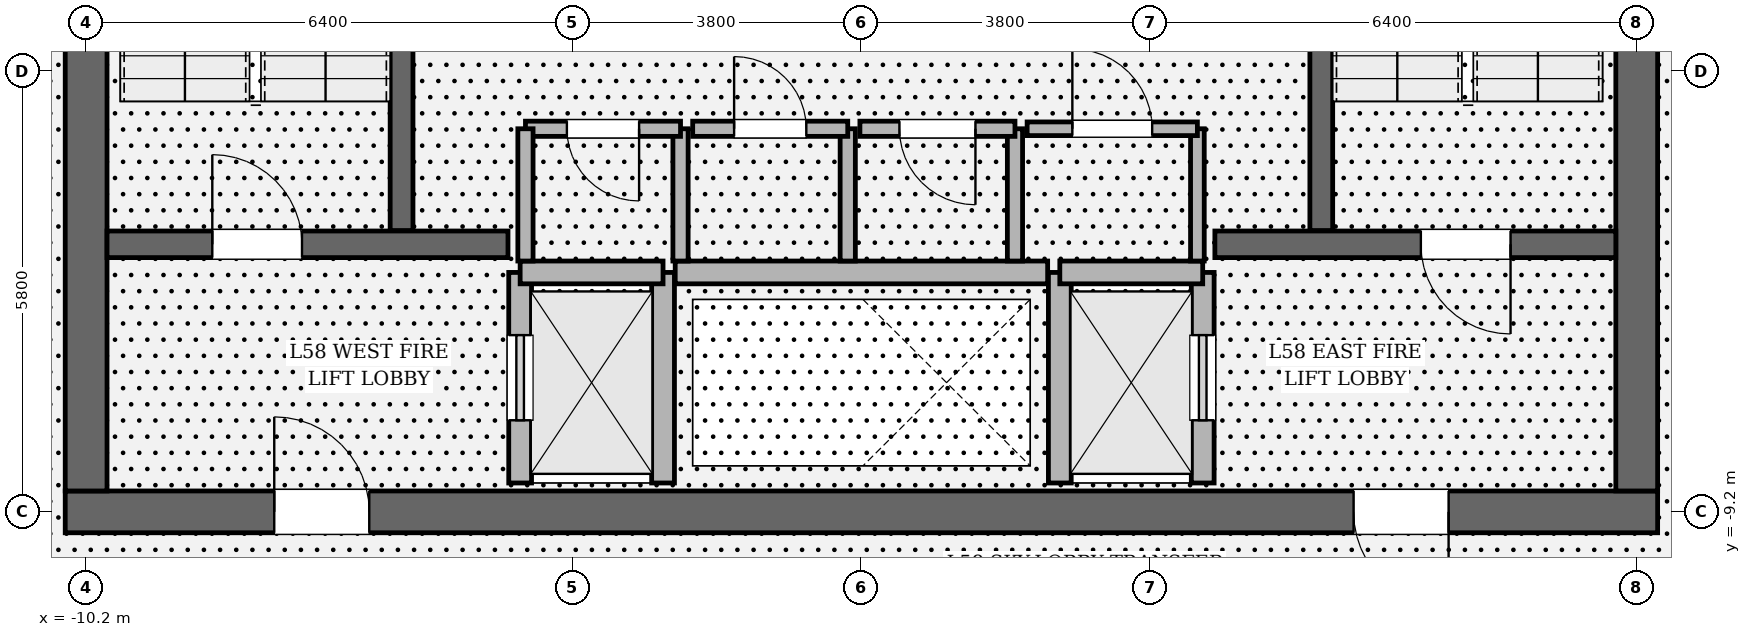
"""IFC4 building model, lengths in metres.
Left out: names, types, materials, properties, quantities, classifications, styles, units other than length and angle.
Written with IfcOpenShell. Run it as: python <this file> out.ifc"""

import sys

from ifc_helpers import new_model, si_unit, direction, frame, frame_2d, origin, place, context, subcontext, project, spatial, rectangle, extrude, element, fill, save


model = new_model("IFC4")
c1 = context("Model", 3, precision=1e-05, world=origin(), true_north=direction((0.0, 1.0)))
c2 = subcontext(c1, "Body", "Model", "MODEL_VIEW")
j1 = project(units=[si_unit("LENGTHUNIT", "METRE"), si_unit("PLANEANGLEUNIT", "RADIAN")], contexts=[c1])
p1 = place(None, origin())
s1 = spatial("IfcSite", under=j1, at=p1, CompositionType="ELEMENT")
p2 = place(p1, origin())
s2 = spatial("IfcBuilding", under=s1, at=p2, CompositionType="ELEMENT")
p3 = place(p2, frame((0.0, 0.0, 246.6)))
s3 = spatial("IfcBuildingStorey", under=s2, at=p3, CompositionType="ELEMENT", Elevation=246.6)
p4 = place(p3, frame((10.475, -9.2, 0.0), z_axis=(0.0, 0.0, 1.0), x_axis=(-1.0, 0.0, 0.0)))
e1 = element("IfcWall", 1, at=p4, inside=s3, PredefinedType="SHEAR", context=c2, shape_type="SweptSolid", body=[
    extrude(rectangle(XDim=20.95, YDim=0.55, at=frame_2d((10.475, 0.0))), origin(), (0.0, 0.0, 1.0), 4.8),
])
p5 = place(p4, frame((2.75, 0.0, 0.0)))
e2 = element("IfcOpeningElement", 2, at=p5, cuts=e1, PredefinedType="OPENING", context=c2, shape_type="SweptSolid", body=[
    extrude(rectangle(XDim=1.25, YDim=2.25, at=frame_2d((0.625, 1.125))), frame((0.0, 0.285, 0.0), z_axis=(0.0, -1.0, 0.0), x_axis=(1.0, 0.0, 0.0)), (0.0, 0.0, 1.0), 0.57),
])
p6 = place(p4, frame((16.95, 0.0, 0.0)))
e3 = element("IfcOpeningElement", 3, at=p6, cuts=e1, PredefinedType="OPENING", context=c2, shape_type="SweptSolid", body=[
    extrude(rectangle(XDim=1.25, YDim=2.25, at=frame_2d((0.625, 1.125))), frame((0.0, 0.285, 0.0), z_axis=(0.0, -1.0, 0.0), x_axis=(1.0, 0.0, 0.0)), (0.0, 0.0, 1.0), 0.57),
])
p7 = place(p3, frame((-10.2, -8.925, 0.0), z_axis=(0.0, 0.0, 1.0), x_axis=(0.0, 1.0, 0.0)))
e4 = element("IfcWall", 4, at=p7, inside=s3, PredefinedType="SHEAR", context=c2, shape_type="SweptSolid", body=[
    extrude(rectangle(XDim=17.85, YDim=0.55, at=frame_2d((8.925, 0.0))), origin(), (0.0, 0.0, 1.0), 4.8),
])
p8 = place(p7, frame((12.715, 0.0, 0.0)))
e5 = element("IfcOpeningElement", 5, at=p8, cuts=e4, PredefinedType="OPENING", context=c2, shape_type="SweptSolid", body=[
    extrude(rectangle(XDim=1.18, YDim=2.2, at=frame_2d((0.59, 1.1))), frame((0.0, 0.285, 0.0), z_axis=(0.0, -1.0, 0.0), x_axis=(1.0, 0.0, 0.0)), (0.0, 0.0, 1.0), 0.57),
])
p9 = place(p3, frame((10.2, 8.925, 0.0), z_axis=(0.0, 0.0, 1.0), x_axis=(0.0, -1.0, 0.0)))
e6 = element("IfcWall", 6, at=p9, inside=s3, PredefinedType="SHEAR", context=c2, shape_type="SweptSolid", body=[
    extrude(rectangle(XDim=17.85, YDim=0.55, at=frame_2d((8.925, 0.0))), origin(), (0.0, 0.0, 1.0), 4.8),
])
p10 = place(p9, frame((3.955, 0.0, 0.0)))
e7 = element("IfcOpeningElement", 7, at=p10, cuts=e6, PredefinedType="OPENING", context=c2, shape_type="SweptSolid", body=[
    extrude(rectangle(XDim=1.18, YDim=2.2, at=frame_2d((0.59, 1.1))), frame((0.0, 0.285, 0.0), z_axis=(0.0, -1.0, 0.0), x_axis=(1.0, 0.0, 0.0)), (0.0, 0.0, 1.0), 0.57),
])
p11 = place(p9, frame((1.765, 0.0, 0.0)))
e8 = element("IfcOpeningElement", 8, at=p11, cuts=e6, PredefinedType="OPENING", context=c2, shape_type="SweptSolid", body=[
    extrude(rectangle(XDim=1.12, YDim=2.25, at=frame_2d((0.56, 1.125))), frame((0.0, 0.285, 0.0), z_axis=(0.0, -1.0, 0.0), x_axis=(1.0, 0.0, 0.0)), (0.0, 0.0, 1.0), 0.57),
])
p12 = place(p9, frame((0.385, 0.0, 0.0)))
e9 = element("IfcOpeningElement", 9, at=p12, cuts=e6, PredefinedType="OPENING", context=c2, shape_type="SweptSolid", body=[
    extrude(rectangle(XDim=1.12, YDim=2.25, at=frame_2d((0.56, 1.125))), frame((0.0, 0.285, 0.0), z_axis=(0.0, -1.0, 0.0), x_axis=(1.0, 0.0, 0.0)), (0.0, 0.0, 1.0), 0.57),
])
for number, where, z_axis, x_axis in (
    (10, (-6.05, -5.5, 0.0), (0.0, 0.0, 1.0), (0.0, 1.0, 0.0)),
    (11, (6.05, 3.45, 0.0), (0.0, 0.0, 1.0), (0.0, -1.0, 0.0)),
):
    element("IfcWall", number, at=place(p3, frame(where, z_axis=z_axis, x_axis=x_axis)), inside=s3, PredefinedType="SOLIDWALL", context=c2, shape_type="SweptSolid", body=[
        extrude(rectangle(XDim=8.95, YDim=0.3, at=frame_2d((4.475, 0.0))), origin(), (0.0, 0.0, 1.0), 4.8),
    ])
p13 = place(p3, frame((-9.925, -5.68, 0.0), z_axis=(0.0, 0.0, 1.0), x_axis=(1.0, 0.0, 0.0)))
e12 = element("IfcWall", 12, at=p13, inside=s3, PredefinedType="SOLIDWALL", context=c2, shape_type="SweptSolid", body=[
    extrude(rectangle(XDim=5.275, YDim=0.35, at=frame_2d((2.638, 0.0))), origin(), (0.0, 0.0, 1.0), 4.8),
])
p14 = place(p13, frame((1.385, 0.0, 0.0)))
e13 = element("IfcOpeningElement", 13, at=p14, cuts=e12, PredefinedType="OPENING", context=c2, shape_type="SweptSolid", body=[
    extrude(rectangle(XDim=1.18, YDim=2.2, at=frame_2d((0.59, 1.1))), frame((0.0, 0.185, 0.0), z_axis=(0.0, -1.0, 0.0), x_axis=(1.0, 0.0, 0.0)), (0.0, 0.0, 1.0), 0.37),
])
p15 = place(p3, frame((4.65, -5.68, 0.0), z_axis=(0.0, 0.0, 1.0), x_axis=(1.0, 0.0, 0.0)))
e14 = element("IfcWall", 14, at=p15, inside=s3, PredefinedType="SOLIDWALL", context=c2, shape_type="SweptSolid", body=[
    extrude(rectangle(XDim=5.275, YDim=0.35, at=frame_2d((2.638, 0.0))), origin(), (0.0, 0.0, 1.0), 4.8),
])
p16 = place(p15, frame((2.71, 0.0, 0.0)))
e15 = element("IfcOpeningElement", 15, at=p16, cuts=e14, PredefinedType="OPENING", context=c2, shape_type="SweptSolid", body=[
    extrude(rectangle(XDim=1.18, YDim=2.2, at=frame_2d((0.59, 1.1))), frame((0.0, 0.185, 0.0), z_axis=(0.0, -1.0, 0.0), x_axis=(1.0, 0.0, 0.0)), (0.0, 0.0, 1.0), 0.37),
])
p17 = place(p3, frame((-4.49, -8.82, 0.0), z_axis=(0.0, 0.0, 1.0), x_axis=(0.0, 1.0, 0.0)))
e16 = element("IfcWall", 16, at=p17, inside=s3, PredefinedType="SOLIDWALL", context=c2, shape_type="SweptSolid", body=[
    extrude(rectangle(XDim=2.77, YDim=0.3, at=frame_2d((1.385, 0.0))), origin(), (0.0, 0.0, 1.0), 4.52),
])
p18 = place(p17, frame((0.825, 0.0, 0.0)))
e17 = element("IfcOpeningElement", 17, at=p18, cuts=e16, PredefinedType="OPENING", context=c2, shape_type="SweptSolid", body=[
    extrude(rectangle(XDim=1.12, YDim=2.25, at=frame_2d((0.56, 1.125))), frame((0.0, 0.16, 0.0), z_axis=(0.0, -1.0, 0.0), x_axis=(1.0, 0.0, 0.0)), (0.0, 0.0, 1.0), 0.32),
])
p19 = place(p3, frame((-2.61, -8.82, 0.0), z_axis=(0.0, 0.0, 1.0), x_axis=(0.0, 1.0, 0.0)))
e18 = element("IfcWall", 18, at=p19, inside=s3, PredefinedType="SOLIDWALL", context=c2, shape_type="SweptSolid", body=[
    extrude(rectangle(XDim=2.77, YDim=0.3, at=frame_2d((1.385, 0.0))), origin(), (0.0, 0.0, 1.0), 4.52),
])
p20 = place(p3, frame((-4.49, -6.05, 0.0), z_axis=(0.0, 0.0, 1.0), x_axis=(1.0, 0.0, 0.0)))
e19 = element("IfcWall", 19, at=p20, inside=s3, PredefinedType="SOLIDWALL", context=c2, shape_type="SweptSolid", body=[
    extrude(rectangle(XDim=1.88, YDim=0.3, at=frame_2d((0.94, 0.0))), origin(), (0.0, 0.0, 1.0), 4.52),
])
p21 = place(p3, frame((4.49, -8.82, 0.0), z_axis=(0.0, 0.0, 1.0), x_axis=(0.0, 1.0, 0.0)))
e20 = element("IfcWall", 20, at=p21, inside=s3, PredefinedType="SOLIDWALL", context=c2, shape_type="SweptSolid", body=[
    extrude(rectangle(XDim=2.77, YDim=0.3, at=frame_2d((1.385, 0.0))), origin(), (0.0, 0.0, 1.0), 4.52),
])
p22 = place(p21, frame((0.825, 0.0, 0.0)))
e21 = element("IfcOpeningElement", 21, at=p22, cuts=e20, PredefinedType="OPENING", context=c2, shape_type="SweptSolid", body=[
    extrude(rectangle(XDim=1.12, YDim=2.25, at=frame_2d((0.56, 1.125))), frame((0.0, 0.16, 0.0), z_axis=(0.0, -1.0, 0.0), x_axis=(1.0, 0.0, 0.0)), (0.0, 0.0, 1.0), 0.32),
])
p23 = place(p3, frame((2.61, -8.82, 0.0), z_axis=(0.0, 0.0, 1.0), x_axis=(0.0, 1.0, 0.0)))
e22 = element("IfcWall", 22, at=p23, inside=s3, PredefinedType="SOLIDWALL", context=c2, shape_type="SweptSolid", body=[
    extrude(rectangle(XDim=2.77, YDim=0.3, at=frame_2d((1.385, 0.0))), origin(), (0.0, 0.0, 1.0), 4.52),
])
p24 = place(p3, frame((2.61, -6.05, 0.0), z_axis=(0.0, 0.0, 1.0), x_axis=(1.0, 0.0, 0.0)))
e23 = element("IfcWall", 23, at=p24, inside=s3, PredefinedType="SOLIDWALL", context=c2, shape_type="SweptSolid", body=[
    extrude(rectangle(XDim=1.88, YDim=0.3, at=frame_2d((0.94, 0.0))), origin(), (0.0, 0.0, 1.0), 4.52),
])
p25 = place(p3, frame((-2.45, -6.05, 0.0), z_axis=(0.0, 0.0, 1.0), x_axis=(1.0, 0.0, 0.0)))
e24 = element("IfcWall", 24, at=p25, inside=s3, PredefinedType="SOLIDWALL", context=c2, shape_type="SweptSolid", body=[
    extrude(rectangle(XDim=4.9, YDim=0.3, at=frame_2d((2.45, 0.0))), origin(), (0.0, 0.0, 1.0), 4.52),
])
p26 = place(p3, frame((-2.38, -5.9, 0.0), z_axis=(0.0, 0.0, 1.0), x_axis=(0.0, 1.0, 0.0)))
e25 = element("IfcWall", 25, at=p26, inside=s3, PredefinedType="SOLIDWALL", context=c2, shape_type="SweptSolid", body=[
    extrude(rectangle(XDim=1.74, YDim=0.2, at=frame_2d((0.87, 0.0))), origin(), (0.0, 0.0, 1.0), 4.52),
])
p27 = place(p3, frame((-2.38, -4.16, 0.0), z_axis=(0.0, 0.0, 1.0), x_axis=(-1.0, 0.0, 0.0)))
e26 = element("IfcWall", 26, at=p27, inside=s3, PredefinedType="SOLIDWALL", context=c2, shape_type="SweptSolid", body=[
    extrude(rectangle(XDim=2.04, YDim=0.2, at=frame_2d((1.02, 0.0))), origin(), (0.0, 0.0, 1.0), 4.52),
])
p28 = place(p27, frame((0.545, 0.0, 0.0)))
e27 = element("IfcOpeningElement", 27, at=p28, cuts=e26, PredefinedType="OPENING", context=c2, shape_type="SweptSolid", body=[
    extrude(rectangle(XDim=0.95, YDim=2.15, at=frame_2d((0.475, 1.075))), frame((0.0, 0.11, 0.0), z_axis=(0.0, -1.0, 0.0), x_axis=(1.0, 0.0, 0.0)), (0.0, 0.0, 1.0), 0.22),
])
for number, where, z_axis, x_axis in (
    (28, (-4.42, -4.16, 0.0), (0.0, 0.0, 1.0), (0.0, -1.0, 0.0)),
    (29, (-0.18, -5.9, 0.0), (0.0, 0.0, 1.0), (0.0, 1.0, 0.0)),
):
    element("IfcWall", number, at=place(p3, frame(where, z_axis=z_axis, x_axis=x_axis)), inside=s3, PredefinedType="SOLIDWALL", context=c2, shape_type="SweptSolid", body=[
        extrude(rectangle(XDim=1.74, YDim=0.2, at=frame_2d((0.87, 0.0))), origin(), (0.0, 0.0, 1.0), 4.52),
    ])
p29 = place(p3, frame((-0.18, -4.16, 0.0), z_axis=(0.0, 0.0, 1.0), x_axis=(-1.0, 0.0, 0.0)))
e30 = element("IfcWall", 30, at=p29, inside=s3, PredefinedType="SOLIDWALL", context=c2, shape_type="SweptSolid", body=[
    extrude(rectangle(XDim=2.04, YDim=0.2, at=frame_2d((1.02, 0.0))), origin(), (0.0, 0.0, 1.0), 4.52),
])
p30 = place(p29, frame((0.545, 0.0, 0.0)))
e31 = element("IfcOpeningElement", 31, at=p30, cuts=e30, PredefinedType="OPENING", context=c2, shape_type="SweptSolid", body=[
    extrude(rectangle(XDim=0.95, YDim=2.15, at=frame_2d((0.475, 1.075))), frame((0.0, 0.11, 0.0), z_axis=(0.0, -1.0, 0.0), x_axis=(1.0, 0.0, 0.0)), (0.0, 0.0, 1.0), 0.22),
])
p31 = place(p3, frame((2.02, -5.9, 0.0), z_axis=(0.0, 0.0, 1.0), x_axis=(0.0, 1.0, 0.0)))
e32 = element("IfcWall", 32, at=p31, inside=s3, PredefinedType="SOLIDWALL", context=c2, shape_type="SweptSolid", body=[
    extrude(rectangle(XDim=1.74, YDim=0.2, at=frame_2d((0.87, 0.0))), origin(), (0.0, 0.0, 1.0), 4.52),
])
p32 = place(p3, frame((2.02, -4.16, 0.0), z_axis=(0.0, 0.0, 1.0), x_axis=(-1.0, 0.0, 0.0)))
e33 = element("IfcWall", 33, at=p32, inside=s3, PredefinedType="SOLIDWALL", context=c2, shape_type="SweptSolid", body=[
    extrude(rectangle(XDim=2.04, YDim=0.2, at=frame_2d((1.02, 0.0))), origin(), (0.0, 0.0, 1.0), 4.52),
])
p33 = place(p32, frame((0.52, 0.0, 0.0)))
e34 = element("IfcOpeningElement", 34, at=p33, cuts=e33, PredefinedType="OPENING", context=c2, shape_type="SweptSolid", body=[
    extrude(rectangle(XDim=1.0, YDim=2.15, at=frame_2d((0.5, 1.075))), frame((0.0, 0.11, 0.0), z_axis=(0.0, -1.0, 0.0), x_axis=(1.0, 0.0, 0.0)), (0.0, 0.0, 1.0), 0.22),
])
p34 = place(p3, frame((4.42, -5.9, 0.0), z_axis=(0.0, 0.0, 1.0), x_axis=(0.0, 1.0, 0.0)))
e35 = element("IfcWall", 35, at=p34, inside=s3, PredefinedType="PARTITIONING", context=c2, shape_type="SweptSolid", body=[
    extrude(rectangle(XDim=1.74, YDim=0.18, at=frame_2d((0.87, 0.0))), origin(), (0.0, 0.0, 1.0), 4.52),
])
p35 = place(p3, frame((4.42, -4.16, 0.0), z_axis=(0.0, 0.0, 1.0), x_axis=(-1.0, 0.0, 0.0)))
e36 = element("IfcWall", 36, at=p35, inside=s3, PredefinedType="PARTITIONING", context=c2, shape_type="SweptSolid", body=[
    extrude(rectangle(XDim=2.24, YDim=0.18, at=frame_2d((1.12, 0.0))), origin(), (0.0, 0.0, 1.0), 4.52),
])
p36 = place(p35, frame((0.595, 0.0, 0.0)))
e37 = element("IfcOpeningElement", 37, at=p36, cuts=e36, PredefinedType="OPENING", context=c2, shape_type="SweptSolid", body=[
    extrude(rectangle(XDim=1.05, YDim=2.2, at=frame_2d((0.525, 1.1))), frame((0.0, 0.1, 0.0), z_axis=(0.0, -1.0, 0.0), x_axis=(1.0, 0.0, 0.0)), (0.0, 0.0, 1.0), 0.2),
])
p37 = place(p14, origin())
e38 = element("IfcDoor", 38, at=p37, inside=s3, OperationType="SINGLE_SWING_LEFT", PredefinedType="DOOR", context=c2, shape_type="SweptSolid", body=[
    extrude(rectangle(XDim=1.18, YDim=2.2, at=frame_2d((0.59, 1.1))), frame((0.0, 0.025, 0.0), z_axis=(0.0, -1.0, 0.0), x_axis=(1.0, 0.0, 0.0)), (0.0, 0.0, 1.0), 0.05),
])
fill(e13, e38)
p38 = place(p16, origin())
e39 = element("IfcDoor", 39, at=p38, inside=s3, OperationType="SINGLE_SWING_RIGHT", PredefinedType="DOOR", context=c2, shape_type="SweptSolid", body=[
    extrude(rectangle(XDim=1.18, YDim=2.2, at=frame_2d((0.59, 1.1))), frame((0.0, 0.025, 0.0), z_axis=(0.0, -1.0, 0.0), x_axis=(1.0, 0.0, 0.0)), (0.0, 0.0, 1.0), 0.05),
])
fill(e15, e39)
p39 = place(p5, origin())
e40 = element("IfcDoor", 40, at=p39, inside=s3, OperationType="SINGLE_SWING_LEFT", PredefinedType="DOOR", context=c2, shape_type="SweptSolid", body=[
    extrude(rectangle(XDim=1.25, YDim=2.25, at=frame_2d((0.625, 1.125))), frame((0.0, 0.025, 0.0), z_axis=(0.0, -1.0, 0.0), x_axis=(1.0, 0.0, 0.0)), (0.0, 0.0, 1.0), 0.05),
])
fill(e2, e40)
p40 = place(p6, origin())
e41 = element("IfcDoor", 41, at=p40, inside=s3, OperationType="SINGLE_SWING_RIGHT", PredefinedType="DOOR", context=c2, shape_type="SweptSolid", body=[
    extrude(rectangle(XDim=1.25, YDim=2.25, at=frame_2d((0.625, 1.125))), frame((0.0, 0.025, 0.0), z_axis=(0.0, -1.0, 0.0), x_axis=(1.0, 0.0, 0.0)), (0.0, 0.0, 1.0), 0.05),
])
fill(e3, e41)
p41 = place(p18, origin())
e42 = element("IfcDoor", 42, at=p41, inside=s3, OperationType="SLIDING_TO_LEFT", PredefinedType="DOOR", context=c2, shape_type="SweptSolid", body=[
    extrude(rectangle(XDim=1.12, YDim=2.25, at=frame_2d((0.56, 1.125))), frame((0.0, 0.025, 0.0), z_axis=(0.0, -1.0, 0.0), x_axis=(1.0, 0.0, 0.0)), (0.0, 0.0, 1.0), 0.05),
])
fill(e17, e42)
p42 = place(p22, origin())
e43 = element("IfcDoor", 43, at=p42, inside=s3, OperationType="SLIDING_TO_RIGHT", PredefinedType="DOOR", context=c2, shape_type="SweptSolid", body=[
    extrude(rectangle(XDim=1.12, YDim=2.25, at=frame_2d((0.56, 1.125))), frame((0.0, 0.025, 0.0), z_axis=(0.0, -1.0, 0.0), x_axis=(1.0, 0.0, 0.0)), (0.0, 0.0, 1.0), 0.05),
])
fill(e21, e43)
p43 = place(p28, origin())
e44 = element("IfcDoor", 44, at=p43, inside=s3, OperationType="SINGLE_SWING_LEFT", PredefinedType="DOOR", context=c2, shape_type="SweptSolid", body=[
    extrude(rectangle(XDim=0.95, YDim=2.15, at=frame_2d((0.475, 1.075))), frame((0.0, 0.025, 0.0), z_axis=(0.0, -1.0, 0.0), x_axis=(1.0, 0.0, 0.0)), (0.0, 0.0, 1.0), 0.05),
])
fill(e27, e44)
p44 = place(p30, origin())
e45 = element("IfcDoor", 45, at=p44, inside=s3, OperationType="SINGLE_SWING_RIGHT", PredefinedType="DOOR", context=c2, shape_type="SweptSolid", body=[
    extrude(rectangle(XDim=0.95, YDim=2.15, at=frame_2d((0.475, 1.075))), frame((0.0, 0.025, 0.0), z_axis=(0.0, -1.0, 0.0), x_axis=(1.0, 0.0, 0.0)), (0.0, 0.0, 1.0), 0.05),
])
fill(e31, e45)
p45 = place(p33, origin())
e46 = element("IfcDoor", 46, at=p45, inside=s3, OperationType="SINGLE_SWING_LEFT", PredefinedType="DOOR", context=c2, shape_type="SweptSolid", body=[
    extrude(rectangle(XDim=1.0, YDim=2.15, at=frame_2d((0.5, 1.075))), frame((0.0, 0.025, 0.0), z_axis=(0.0, -1.0, 0.0), x_axis=(1.0, 0.0, 0.0)), (0.0, 0.0, 1.0), 0.05),
])
fill(e34, e46)
p46 = place(p36, origin())
e47 = element("IfcDoor", 47, at=p46, inside=s3, OperationType="SINGLE_SWING_RIGHT", PredefinedType="DOOR", context=c2, shape_type="SweptSolid", body=[
    extrude(rectangle(XDim=1.05, YDim=2.2, at=frame_2d((0.525, 1.1))), frame((0.0, 0.025, 0.0), z_axis=(0.0, -1.0, 0.0), x_axis=(1.0, 0.0, 0.0)), (0.0, 0.0, 1.0), 0.05),
])
fill(e37, e47)
save(model, sys.argv[1])
